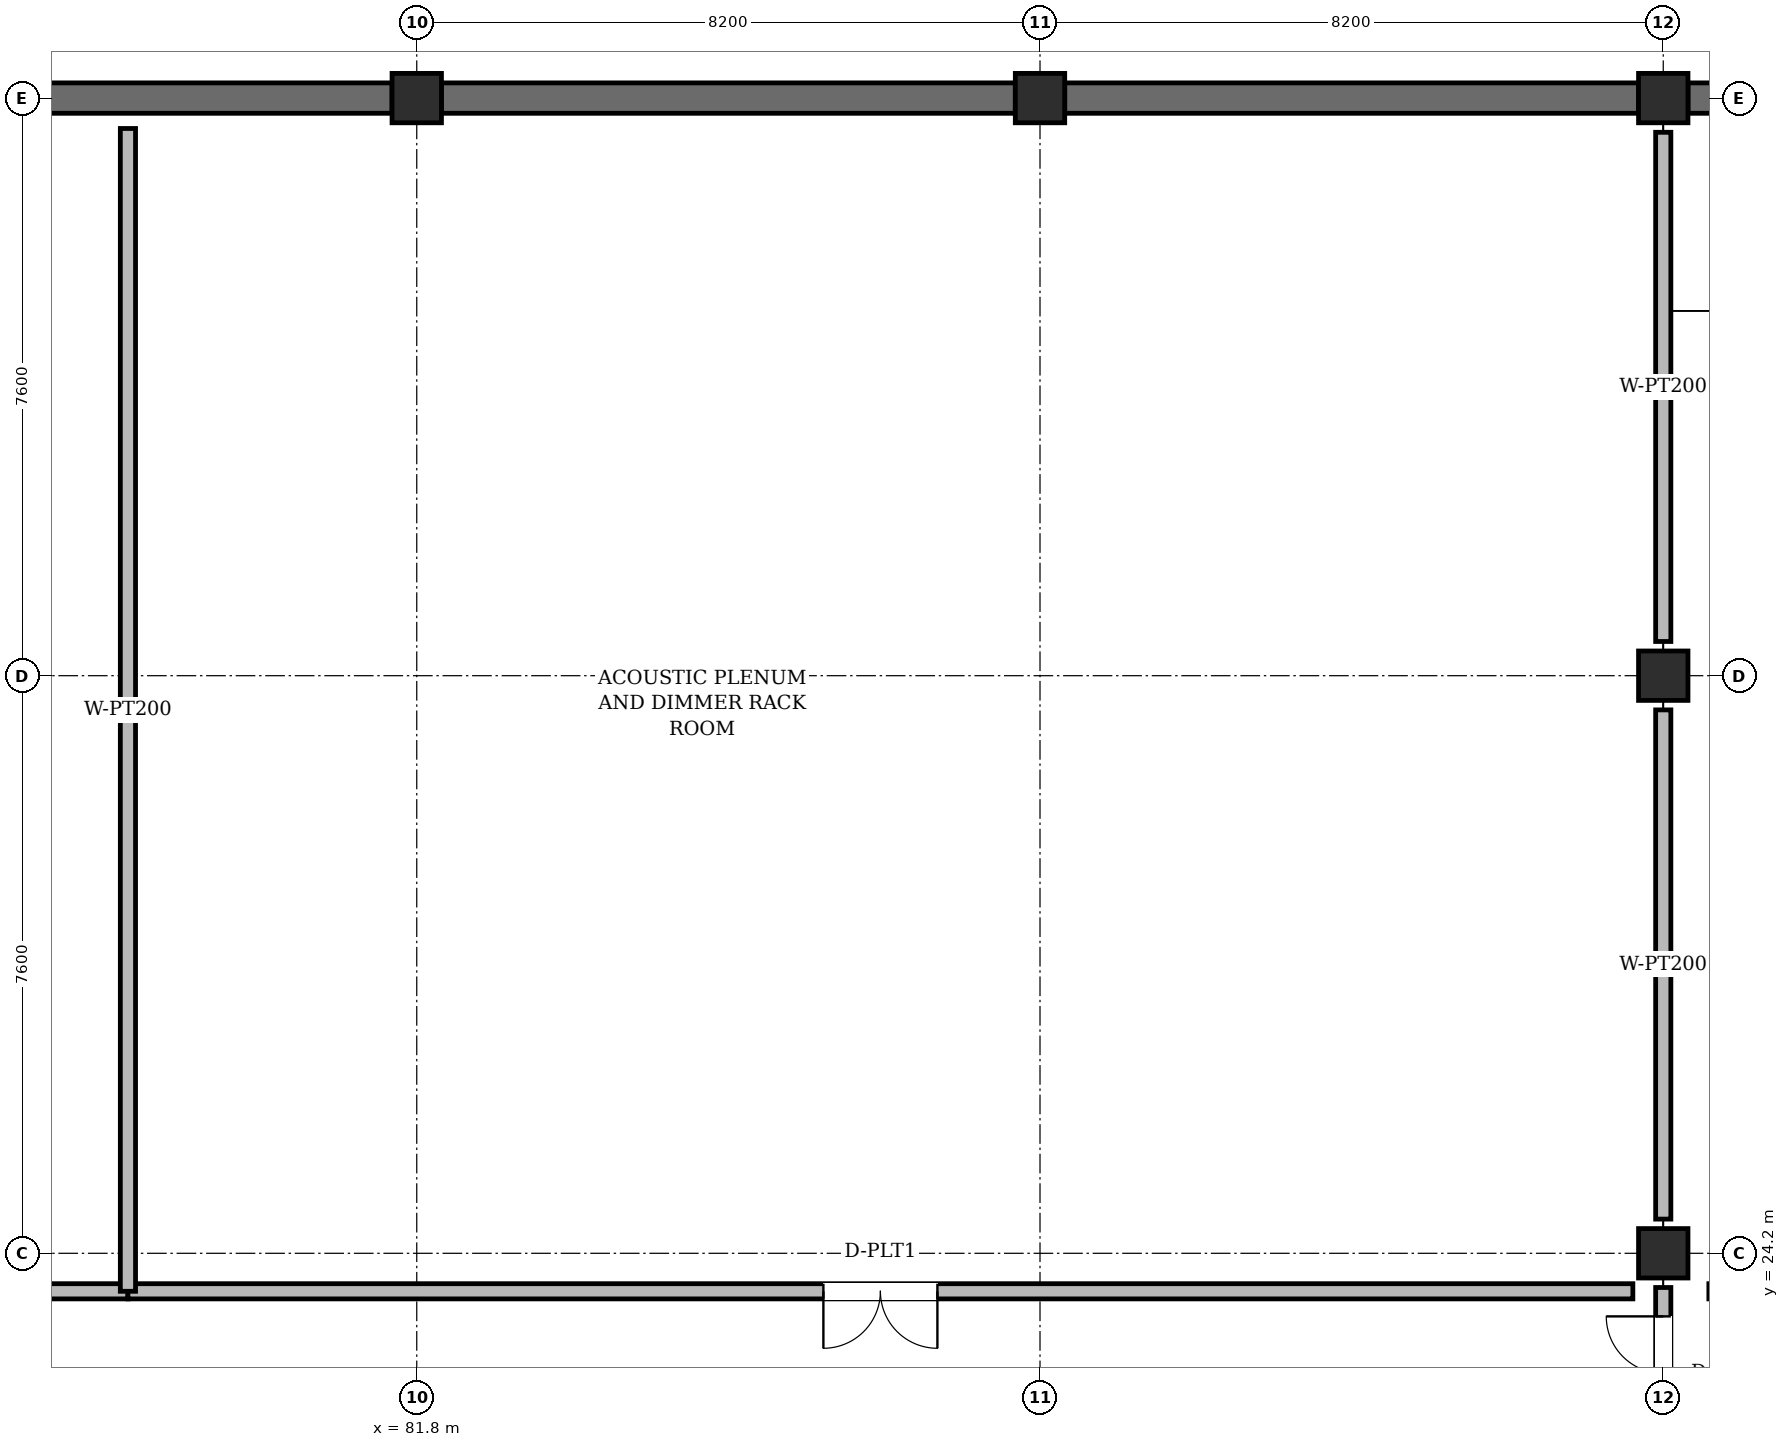
"""IFC4 building model, lengths in metres.
Left out: names, types, materials, properties, quantities, classifications, styles, units other than length and angle.
Written with IfcOpenShell. Run it as: python <this file> out.ifc"""

import sys

from ifc_helpers import new_model, si_unit, direction, frame, frame_2d, origin, origin_2d, place, context, subcontext, project, spatial, rectangle, extrude, element, fill, save


model = new_model("IFC4")
c1 = context("Model", 3, precision=1e-05, world=origin(), true_north=direction((0.0, 1.0)))
c2 = subcontext(c1, "Body", "Model", "MODEL_VIEW")
j1 = project(units=[si_unit("LENGTHUNIT", "METRE"), si_unit("PLANEANGLEUNIT", "RADIAN")], contexts=[c1])
p1 = place(None, origin())
s1 = spatial("IfcSite", under=j1, at=p1, CompositionType="ELEMENT")
p2 = place(p1, origin())
s2 = spatial("IfcBuilding", under=s1, at=p2, CompositionType="ELEMENT")
p3 = place(p2, frame((0.0, 0.0, -4.8)))
s3 = spatial("IfcBuildingStorey", under=s2, at=p3, CompositionType="ELEMENT", Elevation=-4.8)
for number, where, z_axis, x_axis in (
    (1, (81.8, 39.4, 0.0), (0.0, 0.0, 1.0), (1.0, 0.0, 0.0)),
    (2, (90.0, 39.4, 0.0), (0.0, 0.0, 1.0), (1.0, 0.0, 0.0)),
    (3, (98.2, 24.2, 0.0), (0.0, 0.0, 1.0), (1.0, 0.0, 0.0)),
    (4, (98.2, 31.8, 0.0), (0.0, 0.0, 1.0), (1.0, 0.0, 0.0)),
    (5, (98.2, 39.4, 0.0), (0.0, 0.0, 1.0), (1.0, 0.0, 0.0)),
):
    element("IfcColumn", number, at=place(p3, frame(where, z_axis=z_axis, x_axis=x_axis)), inside=s3, PredefinedType="COLUMN", context=c2, shape_type="SweptSolid", body=[
        extrude(rectangle(XDim=0.65, YDim=0.65, at=origin_2d()), origin(), (0.0, 0.0, 1.0), 4.46),
    ])
for number, where, z_axis, x_axis in (
    (6, (73.925, 39.4, 0.0), (0.0, 0.0, 1.0), (1.0, 0.0, 0.0)),
    (7, (82.125, 39.4, 0.0), (0.0, 0.0, 1.0), (1.0, 0.0, 0.0)),
    (8, (90.325, 39.4, 0.0), (0.0, 0.0, 1.0), (1.0, 0.0, 0.0)),
    (9, (98.525, 39.4, 0.0), (0.0, 0.0, 1.0), (1.0, 0.0, 0.0)),
):
    element("IfcWall", number, at=place(p3, frame(where, z_axis=z_axis, x_axis=x_axis)), inside=s3, PredefinedType="SOLIDWALL", context=c2, shape_type="SweptSolid", body=[
        extrude(rectangle(XDim=7.55, YDim=0.4, at=frame_2d((3.775, 0.0))), origin(), (0.0, 0.0, 1.0), 4.46),
    ])
p4 = place(p3, frame((98.2, 17.05, 0.0), z_axis=(0.0, 0.0, 1.0), x_axis=(0.0, 1.0, 0.0)))
e10 = element("IfcWall", 10, at=p4, inside=s3, PredefinedType="PARTITIONING", context=c2, shape_type="SweptSolid", body=[
    extrude(rectangle(XDim=6.7, YDim=0.2, at=frame_2d((3.35, 0.0))), origin(), (0.0, 0.0, 1.0), 3.595),
])
p5 = place(p4, frame((4.82, 0.0, 0.0)))
e11 = element("IfcOpeningElement", 11, at=p5, cuts=e10, PredefinedType="OPENING", context=c2, shape_type="SweptSolid", body=[
    extrude(rectangle(XDim=1.5, YDim=2.2, at=frame_2d((0.75, 1.1))), frame((0.0, 0.112, 0.0), z_axis=(0.0, -1.0, 0.0), x_axis=(1.0, 0.0, 0.0)), (0.0, 0.0, 1.0), 0.224),
])
p6 = place(p3, frame((98.2, 24.65, 0.0), z_axis=(0.0, 0.0, 1.0), x_axis=(0.0, 1.0, 0.0)))
e12 = element("IfcWall", 12, at=p6, inside=s3, PredefinedType="PARTITIONING", context=c2, shape_type="SweptSolid", body=[
    extrude(rectangle(XDim=6.7, YDim=0.2, at=frame_2d((3.35, 0.0))), origin(), (0.0, 0.0, 1.0), 3.595),
])
p7 = place(p3, frame((98.2, 32.25, 0.0), z_axis=(0.0, 0.0, 1.0), x_axis=(0.0, 1.0, 0.0)))
e13 = element("IfcWall", 13, at=p7, inside=s3, PredefinedType="PARTITIONING", context=c2, shape_type="SweptSolid", body=[
    extrude(rectangle(XDim=6.7, YDim=0.2, at=frame_2d((3.35, 0.0))), origin(), (0.0, 0.0, 1.0), 3.595),
])
p8 = place(p3, frame((57.6, 23.7, 0.0), z_axis=(0.0, 0.0, 1.0), x_axis=(1.0, 0.0, 0.0)))
e14 = element("IfcWall", 14, at=p8, inside=s3, PredefinedType="PARTITIONING", context=c2, shape_type="SweptSolid", body=[
    extrude(rectangle(XDim=20.4, YDim=0.2, at=frame_2d((10.2, 0.0))), origin(), (0.0, 0.0, 1.0), 4.405),
])
p9 = place(p8, frame((9.45, 0.0, 0.0)))
e15 = element("IfcOpeningElement", 15, at=p9, cuts=e14, PredefinedType="OPENING", context=c2, shape_type="SweptSolid", body=[
    extrude(rectangle(XDim=1.5, YDim=2.2, at=frame_2d((0.75, 1.1))), frame((0.0, 0.112, 0.0), z_axis=(0.0, -1.0, 0.0), x_axis=(1.0, 0.0, 0.0)), (0.0, 0.0, 1.0), 0.224),
])
p10 = place(p3, frame((78.0, 23.7, 0.0), z_axis=(0.0, 0.0, 1.0), x_axis=(1.0, 0.0, 0.0)))
e16 = element("IfcWall", 16, at=p10, inside=s3, PredefinedType="PARTITIONING", context=c2, shape_type="SweptSolid", body=[
    extrude(rectangle(XDim=19.8, YDim=0.2, at=frame_2d((9.9, 0.0))), origin(), (0.0, 0.0, 1.0), 4.405),
])
p11 = place(p10, frame((9.15, 0.0, 0.0)))
e17 = element("IfcOpeningElement", 17, at=p11, cuts=e16, PredefinedType="OPENING", context=c2, shape_type="SweptSolid", body=[
    extrude(rectangle(XDim=1.5, YDim=2.2, at=frame_2d((0.75, 1.1))), frame((0.0, 0.112, 0.0), z_axis=(0.0, -1.0, 0.0), x_axis=(1.0, 0.0, 0.0)), (0.0, 0.0, 1.0), 0.224),
])
p12 = place(p3, frame((78.0, 39.0, 0.0), z_axis=(0.0, 0.0, 1.0), x_axis=(0.0, -1.0, 0.0)))
e18 = element("IfcWall", 18, at=p12, inside=s3, PredefinedType="PARTITIONING", context=c2, shape_type="SweptSolid", body=[
    extrude(rectangle(XDim=15.3, YDim=0.2, at=frame_2d((7.65, 0.0))), origin(), (0.0, 0.0, 1.0), 4.405),
])
p13 = place(p5, origin())
e19 = element("IfcDoor", 19, at=p13, inside=s3, OperationType="DOUBLE_DOOR_SINGLE_SWING", PredefinedType="DOOR", context=c2, shape_type="SweptSolid", body=[
    extrude(rectangle(XDim=1.5, YDim=2.2, at=frame_2d((0.75, 1.1))), frame((0.0, 0.025, 0.0), z_axis=(0.0, -1.0, 0.0), x_axis=(1.0, 0.0, 0.0)), (0.0, 0.0, 1.0), 0.05),
])
fill(e11, e19)
p14 = place(p11, frame((1.5, 0.0, 0.0), z_axis=(0.0, 0.0, 1.0), x_axis=(-1.0, 0.0, 0.0)))
e20 = element("IfcDoor", 20, at=p14, inside=s3, OperationType="DOUBLE_DOOR_SINGLE_SWING", PredefinedType="DOOR", context=c2, shape_type="SweptSolid", body=[
    extrude(rectangle(XDim=1.5, YDim=2.2, at=frame_2d((0.75, 1.1))), frame((0.0, 0.025, 0.0), z_axis=(0.0, -1.0, 0.0), x_axis=(1.0, 0.0, 0.0)), (0.0, 0.0, 1.0), 0.05),
])
fill(e17, e20)
save(model, sys.argv[1])
